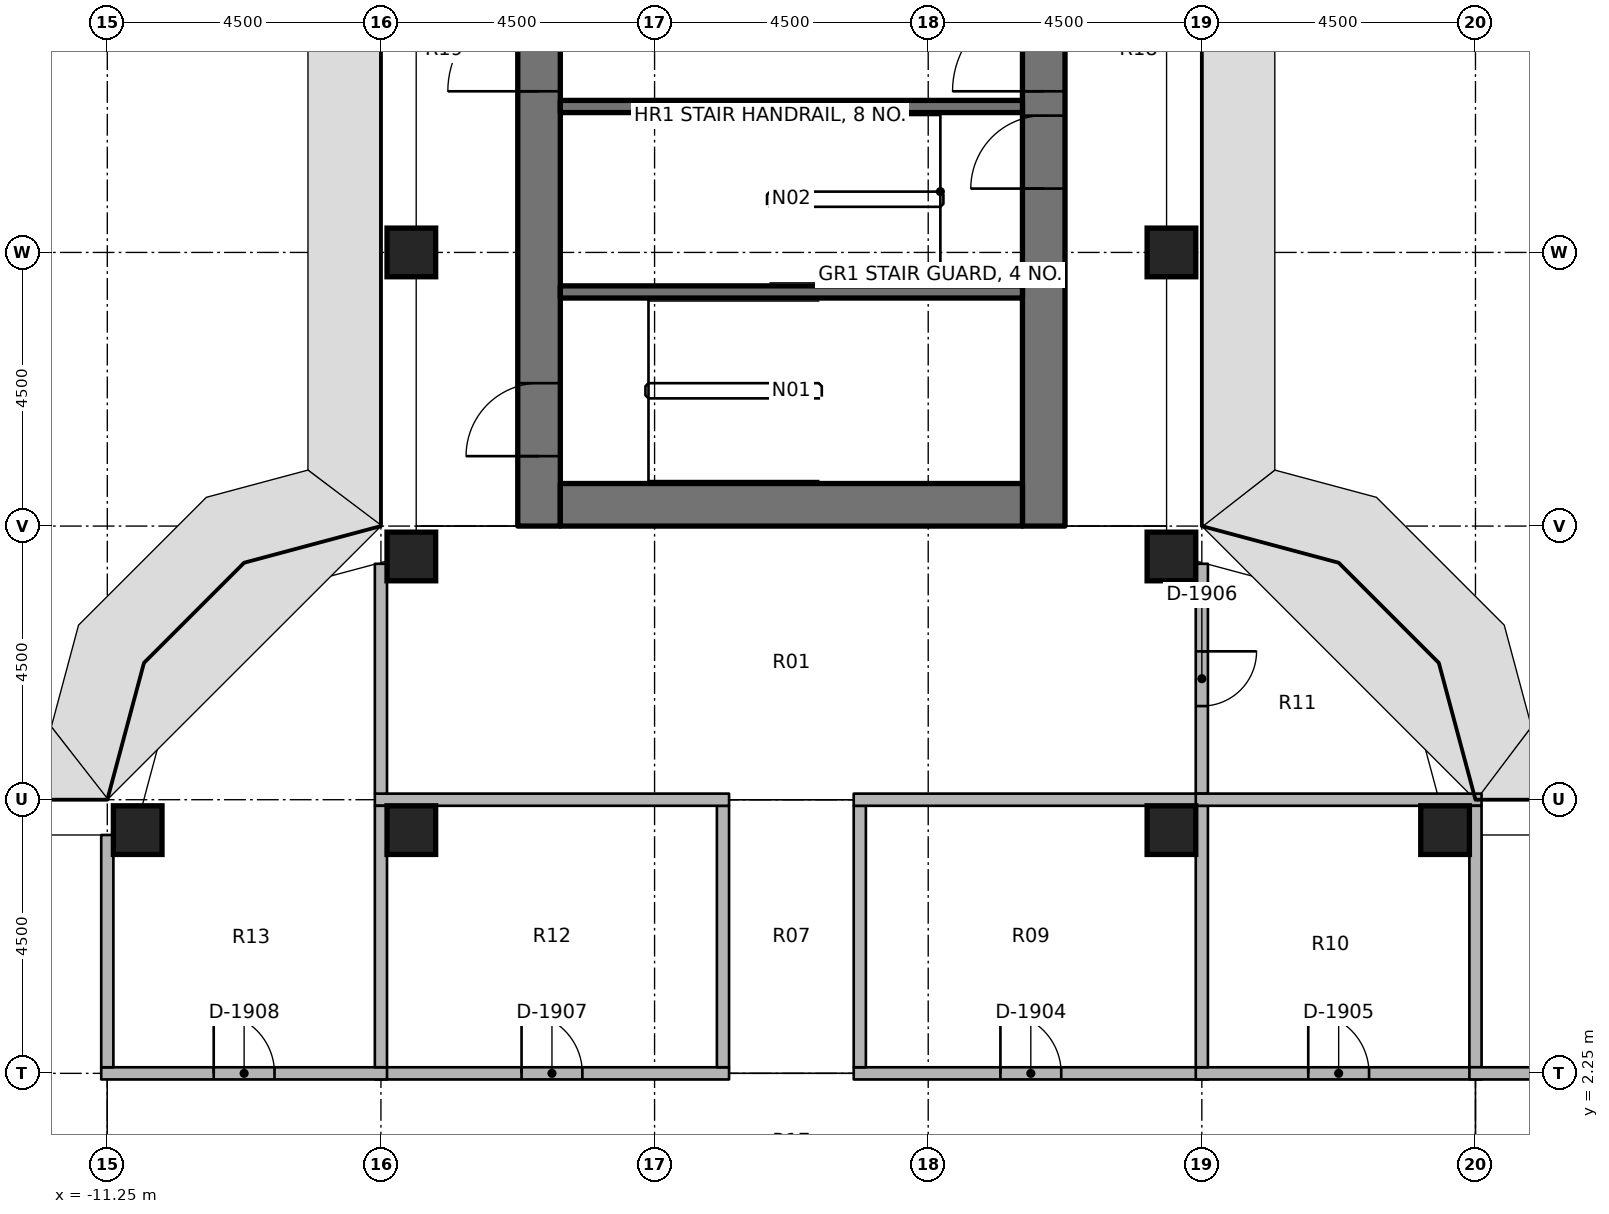
"""IFC4 building model, lengths in metres.
Left out: names, types, materials, properties, quantities, classifications, styles, units other than length and angle.
Written with IfcOpenShell. Run it as: python <this file> out.ifc"""

import sys

from ifc_helpers import new_model, si_unit, direction, frame, frame_2d, origin, origin_2d, place, context, subcontext, project, spatial, rectangle, extrude, element, fill, save


model = new_model("IFC4")
c1 = context("Model", 3, precision=1e-05, world=origin(), true_north=direction((0.0, 1.0)))
c2 = subcontext(c1, "Body", "Model", "MODEL_VIEW")
j1 = project(units=[si_unit("LENGTHUNIT", "METRE"), si_unit("PLANEANGLEUNIT", "RADIAN")], contexts=[c1])
p1 = place(None, origin())
s1 = spatial("IfcSite", under=j1, at=p1, CompositionType="ELEMENT")
p2 = place(p1, origin())
s2 = spatial("IfcBuilding", under=s1, at=p2, CompositionType="ELEMENT")
p3 = place(p2, frame((0.0, 0.0, 179.0)))
s3 = spatial("IfcBuildingStorey", under=s2, at=p3, CompositionType="ELEMENT", Elevation=179.0)
for number, where, z_axis, x_axis in (
    (1, (-10.75, 6.25, 0.0), (0.0, 0.0, 1.0), (1.0, 0.0, 0.0)),
    (2, (-6.25, 6.25, 0.0), (0.0, 0.0, 1.0), (1.0, 0.0, 0.0)),
    (3, (-6.25, 10.75, 0.0), (0.0, 0.0, 1.0), (1.0, 0.0, 0.0)),
    (4, (-6.25, 15.75, 0.0), (0.0, 0.0, 1.0), (1.0, 0.0, 0.0)),
    (5, (6.25, 6.25, 0.0), (0.0, 0.0, 1.0), (1.0, 0.0, 0.0)),
    (6, (6.25, 10.75, 0.0), (0.0, 0.0, 1.0), (1.0, 0.0, 0.0)),
    (7, (6.25, 15.75, 0.0), (0.0, 0.0, 1.0), (1.0, 0.0, 0.0)),
    (8, (10.75, 6.25, 0.0), (0.0, 0.0, 1.0), (1.0, 0.0, 0.0)),
):
    element("IfcColumn", number, at=place(p3, frame(where, z_axis=z_axis, x_axis=x_axis)), inside=s3, PredefinedType="COLUMN", context=c2, shape_type="SweptSolid", body=[
        extrude(rectangle(XDim=0.8, YDim=0.8, at=origin_2d()), origin(), (0.0, 0.0, 1.0), 3.65),
    ])
p4 = place(p3, frame((-4.15, 11.25, 0.0), z_axis=(0.0, 0.0, 1.0), x_axis=(0.0, 1.0, 0.0)))
e9 = element("IfcWall", 9, at=p4, inside=s3, PredefinedType="SHEAR", context=c2, shape_type="SweptSolid", body=[
    extrude(rectangle(XDim=15.0, YDim=0.7, at=frame_2d((7.5, 0.0))), origin(), (0.0, 0.0, 1.0), 3.8),
])
p5 = place(p4, frame((7.15, 0.0, 0.0)))
e10 = element("IfcOpeningElement", 10, at=p5, cuts=e9, PredefinedType="OPENING", context=c2, shape_type="SweptSolid", body=[
    extrude(rectangle(XDim=1.5, YDim=2.3, at=frame_2d((0.75, 1.15))), frame((0.0, 0.36, 0.0), z_axis=(0.0, -1.0, 0.0), x_axis=(1.0, 0.0, 0.0)), (0.0, 0.0, 1.0), 0.72),
])
p6 = place(p4, frame((13.9, 0.0, 0.0)))
e11 = element("IfcOpeningElement", 11, at=p6, cuts=e9, PredefinedType="OPENING", context=c2, shape_type="SweptSolid", body=[
    extrude(rectangle(XDim=0.9, YDim=2.1, at=frame_2d((0.45, 1.05))), frame((0.0, 0.36, 0.0), z_axis=(0.0, -1.0, 0.0), x_axis=(1.0, 0.0, 0.0)), (0.0, 0.0, 1.0), 0.72),
])
p7 = place(p4, frame((1.15, 0.0, 0.0)))
e12 = element("IfcOpeningElement", 12, at=p7, cuts=e9, PredefinedType="OPENING", context=c2, shape_type="SweptSolid", body=[
    extrude(rectangle(XDim=1.2, YDim=2.1, at=frame_2d((0.6, 1.05))), frame((0.0, 0.36, 0.0), z_axis=(0.0, -1.0, 0.0), x_axis=(1.0, 0.0, 0.0)), (0.0, 0.0, 1.0), 0.72),
])
p8 = place(p3, frame((4.15, 11.25, 0.0), z_axis=(0.0, 0.0, 1.0), x_axis=(0.0, 1.0, 0.0)))
e13 = element("IfcWall", 13, at=p8, inside=s3, PredefinedType="SHEAR", context=c2, shape_type="SweptSolid", body=[
    extrude(rectangle(XDim=15.0, YDim=0.7, at=frame_2d((7.5, 0.0))), origin(), (0.0, 0.0, 1.0), 3.8),
])
p9 = place(p8, frame((7.15, 0.0, 0.0)))
e14 = element("IfcOpeningElement", 14, at=p9, cuts=e13, PredefinedType="OPENING", context=c2, shape_type="SweptSolid", body=[
    extrude(rectangle(XDim=1.5, YDim=2.3, at=frame_2d((0.75, 1.15))), frame((0.0, 0.36, 0.0), z_axis=(0.0, -1.0, 0.0), x_axis=(1.0, 0.0, 0.0)), (0.0, 0.0, 1.0), 0.72),
])
p10 = place(p8, frame((5.55, 0.0, 0.0)))
e15 = element("IfcOpeningElement", 15, at=p10, cuts=e13, PredefinedType="OPENING", context=c2, shape_type="SweptSolid", body=[
    extrude(rectangle(XDim=1.2, YDim=2.1, at=frame_2d((0.6, 1.05))), frame((0.0, 0.36, 0.0), z_axis=(0.0, -1.0, 0.0), x_axis=(1.0, 0.0, 0.0)), (0.0, 0.0, 1.0), 0.72),
])
p11 = place(p3, frame((-3.8, 11.6, 0.0), z_axis=(0.0, 0.0, 1.0), x_axis=(1.0, 0.0, 0.0)))
e16 = element("IfcWall", 16, at=p11, inside=s3, PredefinedType="SHEAR", context=c2, shape_type="SweptSolid", body=[
    extrude(rectangle(XDim=7.6, YDim=0.7, at=frame_2d((3.8, 0.0))), origin(), (0.0, 0.0, 1.0), 3.8),
])
for number, where, z_axis, x_axis in (
    (17, (-3.8, 18.15, 0.0), (0.0, 0.0, 1.0), (1.0, 0.0, 0.0)),
    (18, (-3.8, 15.1, 0.0), (0.0, 0.0, 1.0), (1.0, 0.0, 0.0)),
):
    element("IfcWall", number, at=place(p3, frame(where, z_axis=z_axis, x_axis=x_axis)), inside=s3, PredefinedType="SHEAR", context=c2, shape_type="SweptSolid", body=[
        extrude(rectangle(XDim=7.6, YDim=0.2, at=frame_2d((3.8, 0.0))), origin(), (0.0, 0.0, 1.0), 3.65),
    ])
p12 = place(p3, frame((1.025, 2.25, 0.0), z_axis=(0.0, 0.0, 1.0), x_axis=(1.0, 0.0, 0.0)))
e19 = element("IfcWall", 19, at=p12, inside=s3, PredefinedType="PARTITIONING", context=c2, shape_type="SweptSolid", body=[
    extrude(rectangle(XDim=5.825, YDim=0.2, at=frame_2d((2.913, 0.0))), origin(), (0.0, 0.0, 1.0), 2.75),
])
p13 = place(p12, frame((2.413, 0.0, 0.0)))
e20 = element("IfcOpeningElement", 20, at=p13, cuts=e19, PredefinedType="OPENING", context=c2, shape_type="SweptSolid", body=[
    extrude(rectangle(XDim=1.0, YDim=2.1, at=frame_2d((0.5, 1.05))), frame((0.0, 0.11, 0.0), z_axis=(0.0, -1.0, 0.0), x_axis=(1.0, 0.0, 0.0)), (0.0, 0.0, 1.0), 0.22),
])
p14 = place(p3, frame((6.65, 2.25, 0.0), z_axis=(0.0, 0.0, 1.0), x_axis=(1.0, 0.0, 0.0)))
e21 = element("IfcWall", 21, at=p14, inside=s3, PredefinedType="PARTITIONING", context=c2, shape_type="SweptSolid", body=[
    extrude(rectangle(XDim=4.7, YDim=0.2, at=frame_2d((2.35, 0.0))), origin(), (0.0, 0.0, 1.0), 2.75),
])
p15 = place(p14, frame((1.85, 0.0, 0.0)))
e22 = element("IfcOpeningElement", 22, at=p15, cuts=e21, PredefinedType="OPENING", context=c2, shape_type="SweptSolid", body=[
    extrude(rectangle(XDim=1.0, YDim=2.1, at=frame_2d((0.5, 1.05))), frame((0.0, 0.11, 0.0), z_axis=(0.0, -1.0, 0.0), x_axis=(1.0, 0.0, 0.0)), (0.0, 0.0, 1.0), 0.22),
])
p16 = place(p3, frame((-6.85, 2.25, 0.0), z_axis=(0.0, 0.0, 1.0), x_axis=(1.0, 0.0, 0.0)))
e23 = element("IfcWall", 23, at=p16, inside=s3, PredefinedType="PARTITIONING", context=c2, shape_type="SweptSolid", body=[
    extrude(rectangle(XDim=5.825, YDim=0.2, at=frame_2d((2.913, 0.0))), origin(), (0.0, 0.0, 1.0), 2.75),
])
p17 = place(p16, frame((2.413, 0.0, 0.0)))
e24 = element("IfcOpeningElement", 24, at=p17, cuts=e23, PredefinedType="OPENING", context=c2, shape_type="SweptSolid", body=[
    extrude(rectangle(XDim=1.0, YDim=2.1, at=frame_2d((0.5, 1.05))), frame((0.0, 0.11, 0.0), z_axis=(0.0, -1.0, 0.0), x_axis=(1.0, 0.0, 0.0)), (0.0, 0.0, 1.0), 0.22),
])
p18 = place(p3, frame((-11.35, 2.25, 0.0), z_axis=(0.0, 0.0, 1.0), x_axis=(1.0, 0.0, 0.0)))
e25 = element("IfcWall", 25, at=p18, inside=s3, PredefinedType="PARTITIONING", context=c2, shape_type="SweptSolid", body=[
    extrude(rectangle(XDim=4.7, YDim=0.2, at=frame_2d((2.35, 0.0))), origin(), (0.0, 0.0, 1.0), 2.75),
])
p19 = place(p18, frame((1.85, 0.0, 0.0)))
e26 = element("IfcOpeningElement", 26, at=p19, cuts=e25, PredefinedType="OPENING", context=c2, shape_type="SweptSolid", body=[
    extrude(rectangle(XDim=1.0, YDim=2.1, at=frame_2d((0.5, 1.05))), frame((0.0, 0.11, 0.0), z_axis=(0.0, -1.0, 0.0), x_axis=(1.0, 0.0, 0.0)), (0.0, 0.0, 1.0), 0.22),
])
for number, where, z_axis, x_axis in (
    (27, (1.125, 2.35, 0.0), (0.0, 0.0, 1.0), (0.0, 1.0, 0.0)),
    (28, (-1.125, 2.35, 0.0), (0.0, 0.0, 1.0), (0.0, 1.0, 0.0)),
):
    element("IfcWall", number, at=place(p3, frame(where, z_axis=z_axis, x_axis=x_axis)), inside=s3, PredefinedType="PARTITIONING", context=c2, shape_type="SweptSolid", body=[
        extrude(rectangle(XDim=4.3, YDim=0.2, at=frame_2d((2.15, 0.0))), origin(), (0.0, 0.0, 1.0), 2.75),
    ])
p20 = place(p3, frame((1.025, 6.75, 0.0), z_axis=(0.0, 0.0, 1.0), x_axis=(1.0, 0.0, 0.0)))
e29 = element("IfcWall", 29, at=p20, inside=s3, PredefinedType="PARTITIONING", context=c2, shape_type="SweptSolid", body=[
    extrude(rectangle(XDim=5.825, YDim=0.2, at=frame_2d((2.913, 0.0))), origin(), (0.0, 0.0, 1.0), 2.75),
])
p21 = place(p3, frame((6.75, 10.63, 0.0), z_axis=(0.0, 0.0, 1.0), x_axis=(0.0, -1.0, 0.0)))
e30 = element("IfcWall", 30, at=p21, inside=s3, PredefinedType="PARTITIONING", context=c2, shape_type="SweptSolid", body=[
    extrude(rectangle(XDim=3.78, YDim=0.2, at=frame_2d((1.89, 0.0))), origin(), (0.0, 0.0, 1.0), 2.75),
])
p22 = place(p21, frame((1.44, 0.0, 0.0)))
e31 = element("IfcOpeningElement", 31, at=p22, cuts=e30, PredefinedType="OPENING", context=c2, shape_type="SweptSolid", body=[
    extrude(rectangle(XDim=0.9, YDim=2.1, at=frame_2d((0.45, 1.05))), frame((0.0, 0.11, 0.0), z_axis=(0.0, -1.0, 0.0), x_axis=(1.0, 0.0, 0.0)), (0.0, 0.0, 1.0), 0.22),
])
p23 = place(p3, frame((-6.85, 6.75, 0.0), z_axis=(0.0, 0.0, 1.0), x_axis=(1.0, 0.0, 0.0)))
e32 = element("IfcWall", 32, at=p23, inside=s3, PredefinedType="PARTITIONING", context=c2, shape_type="SweptSolid", body=[
    extrude(rectangle(XDim=5.825, YDim=0.2, at=frame_2d((2.913, 0.0))), origin(), (0.0, 0.0, 1.0), 2.75),
])
p24 = place(p3, frame((-6.75, 6.85, 0.0), z_axis=(0.0, 0.0, 1.0), x_axis=(0.0, 1.0, 0.0)))
e33 = element("IfcWall", 33, at=p24, inside=s3, PredefinedType="PARTITIONING", context=c2, shape_type="SweptSolid", body=[
    extrude(rectangle(XDim=3.78, YDim=0.2, at=frame_2d((1.89, 0.0))), origin(), (0.0, 0.0, 1.0), 2.75),
])
p25 = place(p3, frame((6.75, 2.35, 0.0), z_axis=(0.0, 0.0, 1.0), x_axis=(0.0, 1.0, 0.0)))
e34 = element("IfcWall", 34, at=p25, inside=s3, PredefinedType="PARTITIONING", context=c2, shape_type="SweptSolid", body=[
    extrude(rectangle(XDim=4.3, YDim=0.2, at=frame_2d((2.15, 0.0))), origin(), (0.0, 0.0, 1.0), 2.75),
])
p26 = place(p3, frame((6.65, 6.75, 0.0), z_axis=(0.0, 0.0, 1.0), x_axis=(1.0, 0.0, 0.0)))
e35 = element("IfcWall", 35, at=p26, inside=s3, PredefinedType="PARTITIONING", context=c2, shape_type="SweptSolid", body=[
    extrude(rectangle(XDim=4.7, YDim=0.2, at=frame_2d((2.35, 0.0))), origin(), (0.0, 0.0, 1.0), 2.75),
])
for number, where, z_axis, x_axis in (
    (36, (11.25, 2.35, 0.0), (0.0, 0.0, 1.0), (0.0, 1.0, 0.0)),
    (37, (-6.75, 2.35, 0.0), (0.0, 0.0, 1.0), (0.0, 1.0, 0.0)),
):
    element("IfcWall", number, at=place(p3, frame(where, z_axis=z_axis, x_axis=x_axis)), inside=s3, PredefinedType="PARTITIONING", context=c2, shape_type="SweptSolid", body=[
        extrude(rectangle(XDim=4.3, YDim=0.2, at=frame_2d((2.15, 0.0))), origin(), (0.0, 0.0, 1.0), 2.75),
    ])
p27 = place(p3, frame((-11.25, 2.35, 0.0), z_axis=(0.0, 0.0, 1.0), x_axis=(0.0, 1.0, 0.0)))
e38 = element("IfcWall", 38, at=p27, inside=s3, PredefinedType="PARTITIONING", context=c2, shape_type="SweptSolid", body=[
    extrude(rectangle(XDim=3.82, YDim=0.2, at=frame_2d((1.91, 0.0))), origin(), (0.0, 0.0, 1.0), 2.75),
])
p28 = place(p3, frame((11.15, 2.25, 0.0), z_axis=(0.0, 0.0, 1.0), x_axis=(1.0, 0.0, 0.0)))
e39 = element("IfcWall", 39, at=p28, inside=s3, PredefinedType="PARTITIONING", context=c2, shape_type="SweptSolid", body=[
    extrude(rectangle(XDim=4.7, YDim=0.2, at=frame_2d((2.35, 0.0))), origin(), (0.0, 0.0, 1.0), 2.75),
])
p29 = place(p28, frame((1.85, 0.0, 0.0)))
e40 = element("IfcOpeningElement", 40, at=p29, cuts=e39, PredefinedType="OPENING", context=c2, shape_type="SweptSolid", body=[
    extrude(rectangle(XDim=1.0, YDim=2.1, at=frame_2d((0.5, 1.05))), frame((0.0, 0.11, 0.0), z_axis=(0.0, -1.0, 0.0), x_axis=(1.0, 0.0, 0.0)), (0.0, 0.0, 1.0), 0.22),
])
p30 = place(p5, origin())
e41 = element("IfcDoor", 41, at=p30, inside=s3, OperationType="DOUBLE_DOOR_SINGLE_SWING", PredefinedType="DOOR", context=c2, shape_type="SweptSolid", body=[
    extrude(rectangle(XDim=1.5, YDim=2.3, at=frame_2d((0.75, 1.15))), frame((0.0, 0.025, 0.0), z_axis=(0.0, -1.0, 0.0), x_axis=(1.0, 0.0, 0.0)), (0.0, 0.0, 1.0), 0.05),
])
fill(e10, e41)
p31 = place(p9, origin())
e42 = element("IfcDoor", 42, at=p31, inside=s3, OperationType="DOUBLE_DOOR_SINGLE_SWING", PredefinedType="DOOR", context=c2, shape_type="SweptSolid", body=[
    extrude(rectangle(XDim=1.5, YDim=2.3, at=frame_2d((0.75, 1.15))), frame((0.0, 0.025, 0.0), z_axis=(0.0, -1.0, 0.0), x_axis=(1.0, 0.0, 0.0)), (0.0, 0.0, 1.0), 0.05),
])
fill(e14, e42)
p32 = place(p10, origin())
e43 = element("IfcDoor", 43, at=p32, inside=s3, OperationType="SINGLE_SWING_LEFT", PredefinedType="DOOR", context=c2, shape_type="SweptSolid", body=[
    extrude(rectangle(XDim=1.2, YDim=2.1, at=frame_2d((0.6, 1.05))), frame((0.0, 0.025, 0.0), z_axis=(0.0, -1.0, 0.0), x_axis=(1.0, 0.0, 0.0)), (0.0, 0.0, 1.0), 0.05),
])
fill(e15, e43)
p33 = place(p7, origin())
e44 = element("IfcDoor", 44, at=p33, inside=s3, OperationType="SINGLE_SWING_RIGHT", PredefinedType="DOOR", context=c2, shape_type="SweptSolid", body=[
    extrude(rectangle(XDim=1.2, YDim=2.1, at=frame_2d((0.6, 1.05))), frame((0.0, 0.025, 0.0), z_axis=(0.0, -1.0, 0.0), x_axis=(1.0, 0.0, 0.0)), (0.0, 0.0, 1.0), 0.05),
])
fill(e12, e44)
p34 = place(p13, origin())
e45 = element("IfcDoor", 45, at=p34, inside=s3, OperationType="SINGLE_SWING_RIGHT", PredefinedType="DOOR", context=c2, shape_type="SweptSolid", body=[
    extrude(rectangle(XDim=1.0, YDim=2.1, at=frame_2d((0.5, 1.05))), frame((0.0, 0.025, 0.0), z_axis=(0.0, -1.0, 0.0), x_axis=(1.0, 0.0, 0.0)), (0.0, 0.0, 1.0), 0.05),
])
fill(e20, e45)
p35 = place(p15, origin())
e46 = element("IfcDoor", 46, at=p35, inside=s3, OperationType="SINGLE_SWING_RIGHT", PredefinedType="DOOR", context=c2, shape_type="SweptSolid", body=[
    extrude(rectangle(XDim=1.0, YDim=2.1, at=frame_2d((0.5, 1.05))), frame((0.0, 0.025, 0.0), z_axis=(0.0, -1.0, 0.0), x_axis=(1.0, 0.0, 0.0)), (0.0, 0.0, 1.0), 0.05),
])
fill(e22, e46)
p36 = place(p22, origin())
e47 = element("IfcDoor", 47, at=p36, inside=s3, OperationType="SINGLE_SWING_RIGHT", PredefinedType="DOOR", context=c2, shape_type="SweptSolid", body=[
    extrude(rectangle(XDim=0.9, YDim=2.1, at=frame_2d((0.45, 1.05))), frame((0.0, 0.025, 0.0), z_axis=(0.0, -1.0, 0.0), x_axis=(1.0, 0.0, 0.0)), (0.0, 0.0, 1.0), 0.05),
])
fill(e31, e47)
p37 = place(p17, origin())
e48 = element("IfcDoor", 48, at=p37, inside=s3, OperationType="SINGLE_SWING_RIGHT", PredefinedType="DOOR", context=c2, shape_type="SweptSolid", body=[
    extrude(rectangle(XDim=1.0, YDim=2.1, at=frame_2d((0.5, 1.05))), frame((0.0, 0.025, 0.0), z_axis=(0.0, -1.0, 0.0), x_axis=(1.0, 0.0, 0.0)), (0.0, 0.0, 1.0), 0.05),
])
fill(e24, e48)
p38 = place(p19, origin())
e49 = element("IfcDoor", 49, at=p38, inside=s3, OperationType="SINGLE_SWING_RIGHT", PredefinedType="DOOR", context=c2, shape_type="SweptSolid", body=[
    extrude(rectangle(XDim=1.0, YDim=2.1, at=frame_2d((0.5, 1.05))), frame((0.0, 0.025, 0.0), z_axis=(0.0, -1.0, 0.0), x_axis=(1.0, 0.0, 0.0)), (0.0, 0.0, 1.0), 0.05),
])
fill(e26, e49)
save(model, sys.argv[1])
